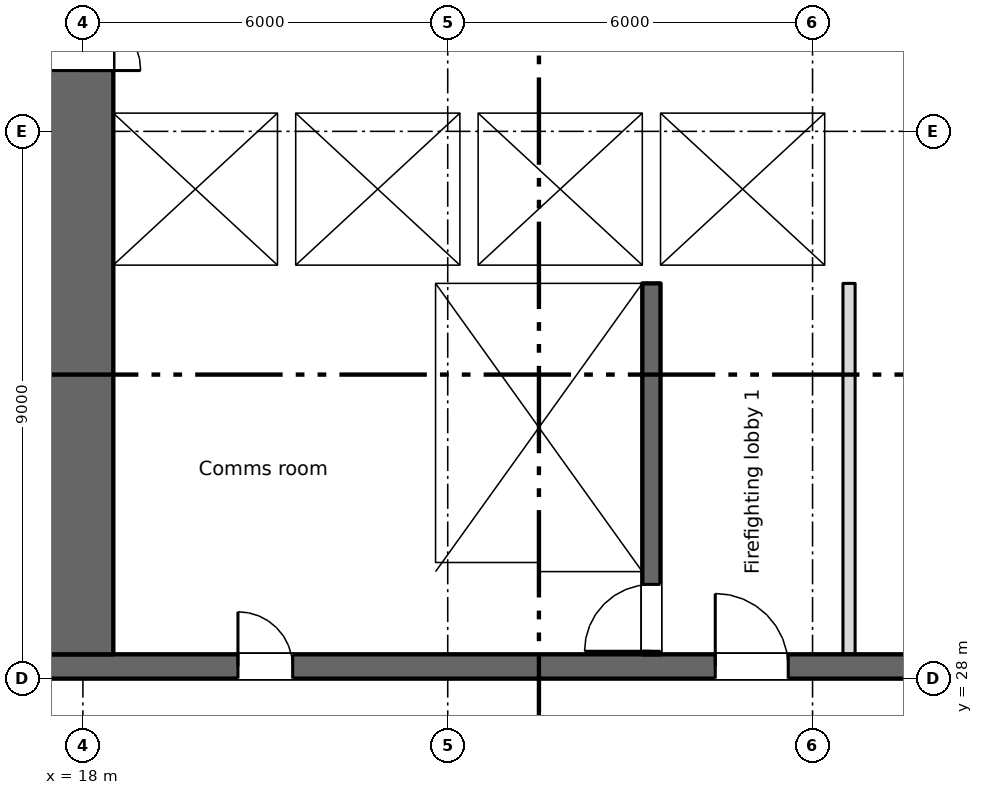
"""IFC4 building model, lengths in metres.
Left out: names, types, materials, properties, quantities, classifications, styles, units other than length and angle.
Written with IfcOpenShell. Run it as: python <this file> out.ifc"""

import sys

from ifc_helpers import new_model, si_unit, direction, frame, frame_2d, origin, place, context, subcontext, project, spatial, rectangle, extrude, element, fill, save


model = new_model("IFC4")
c1 = context("Model", 3, precision=1e-05, world=origin(), true_north=direction((0.0, 1.0)))
c2 = subcontext(c1, "Body", "Model", "MODEL_VIEW")
j1 = project(units=[si_unit("LENGTHUNIT", "METRE"), si_unit("PLANEANGLEUNIT", "RADIAN")], contexts=[c1])
p1 = place(None, origin())
s1 = spatial("IfcSite", under=j1, at=p1, CompositionType="ELEMENT")
p2 = place(p1, origin())
s2 = spatial("IfcBuilding", under=s1, at=p2, CompositionType="ELEMENT")
p3 = place(p2, frame((0.0, 0.0, 11.3)))
s3 = spatial("IfcBuildingStorey", under=s2, at=p3, CompositionType="ELEMENT", Elevation=11.3)
p4 = place(p3, frame((6.7, 28.2, 0.0), z_axis=(0.0, 0.0, 1.0), x_axis=(1.0, 0.0, 0.0)))
e1 = element("IfcWall", 1, at=p4, inside=s3, PredefinedType="SHEAR", context=c2, shape_type="SweptSolid", body=[
    extrude(rectangle(XDim=66.3, YDim=0.4, at=frame_2d((33.15, 0.0))), origin(), (0.0, 0.0, 1.0), 6.1),
])
p5 = place(p4, frame((13.85, 0.0, 0.0)))
e2 = element("IfcOpeningElement", 2, at=p5, cuts=e1, PredefinedType="OPENING", context=c2, shape_type="SweptSolid", body=[
    extrude(rectangle(XDim=0.9, YDim=2.1, at=frame_2d((0.45, 1.05))), frame((0.0, 0.21, 0.0), z_axis=(0.0, -1.0, 0.0), x_axis=(1.0, 0.0, 0.0)), (0.0, 0.0, 1.0), 0.42),
])
p6 = place(p4, frame((48.562, 0.0, 0.0)))
e3 = element("IfcOpeningElement", 3, at=p6, cuts=e1, PredefinedType="OPENING", context=c2, shape_type="SweptSolid", body=[
    extrude(rectangle(XDim=0.9, YDim=2.1, at=frame_2d((0.45, 1.05))), frame((0.0, 0.21, 0.0), z_axis=(0.0, -1.0, 0.0), x_axis=(1.0, 0.0, 0.0)), (0.0, 0.0, 1.0), 0.42),
])
p7 = place(p4, frame((51.137, 0.0, 0.0)))
e4 = element("IfcOpeningElement", 4, at=p7, cuts=e1, PredefinedType="OPENING", context=c2, shape_type="SweptSolid", body=[
    extrude(rectangle(XDim=0.9, YDim=2.1, at=frame_2d((0.45, 1.05))), frame((0.0, 0.21, 0.0), z_axis=(0.0, -1.0, 0.0), x_axis=(1.0, 0.0, 0.0)), (0.0, 0.0, 1.0), 0.42),
])
p8 = place(p4, frame((1.35, 0.0, 0.0)))
e5 = element("IfcOpeningElement", 5, at=p8, cuts=e1, PredefinedType="OPENING", context=c2, shape_type="SweptSolid", body=[
    extrude(rectangle(XDim=0.9, YDim=2.1, at=frame_2d((0.45, 1.05))), frame((0.0, 0.21, 0.0), z_axis=(0.0, -1.0, 0.0), x_axis=(1.0, 0.0, 0.0)), (0.0, 0.0, 1.0), 0.42),
])
p9 = place(p4, frame((59.363, 0.0, 0.0)))
e6 = element("IfcOpeningElement", 6, at=p9, cuts=e1, PredefinedType="OPENING", context=c2, shape_type="SweptSolid", body=[
    extrude(rectangle(XDim=0.9, YDim=2.1, at=frame_2d((0.45, 1.05))), frame((0.0, 0.21, 0.0), z_axis=(0.0, -1.0, 0.0), x_axis=(1.0, 0.0, 0.0)), (0.0, 0.0, 1.0), 0.42),
])
p10 = place(p4, frame((63.538, 0.0, 0.0)))
e7 = element("IfcOpeningElement", 7, at=p10, cuts=e1, PredefinedType="OPENING", context=c2, shape_type="SweptSolid", body=[
    extrude(rectangle(XDim=0.9, YDim=2.1, at=frame_2d((0.45, 1.05))), frame((0.0, 0.21, 0.0), z_axis=(0.0, -1.0, 0.0), x_axis=(1.0, 0.0, 0.0)), (0.0, 0.0, 1.0), 0.42),
])
p11 = place(p4, frame((4.7, 0.0, 0.0)))
e8 = element("IfcOpeningElement", 8, at=p11, cuts=e1, PredefinedType="OPENING", context=c2, shape_type="SweptSolid", body=[
    extrude(rectangle(XDim=1.2, YDim=2.1, at=frame_2d((0.6, 1.05))), frame((0.0, 0.21, 0.0), z_axis=(0.0, -1.0, 0.0), x_axis=(1.0, 0.0, 0.0)), (0.0, 0.0, 1.0), 0.42),
])
p12 = place(p4, frame((31.7, 0.0, 0.0)))
e9 = element("IfcOpeningElement", 9, at=p12, cuts=e1, PredefinedType="OPENING", context=c2, shape_type="SweptSolid", body=[
    extrude(rectangle(XDim=1.2, YDim=2.1, at=frame_2d((0.6, 1.05))), frame((0.0, 0.21, 0.0), z_axis=(0.0, -1.0, 0.0), x_axis=(1.0, 0.0, 0.0)), (0.0, 0.0, 1.0), 0.42),
])
p13 = place(p4, frame((55.2, 0.0, 0.0)))
e10 = element("IfcOpeningElement", 10, at=p13, cuts=e1, PredefinedType="OPENING", context=c2, shape_type="SweptSolid", body=[
    extrude(rectangle(XDim=1.2, YDim=2.1, at=frame_2d((0.6, 1.05))), frame((0.0, 0.21, 0.0), z_axis=(0.0, -1.0, 0.0), x_axis=(1.0, 0.0, 0.0)), (0.0, 0.0, 1.0), 0.42),
])
p14 = place(p4, frame((21.7, 0.0, 0.0)))
e11 = element("IfcOpeningElement", 11, at=p14, cuts=e1, PredefinedType="OPENING", context=c2, shape_type="SweptSolid", body=[
    extrude(rectangle(XDim=1.2, YDim=2.1, at=frame_2d((0.6, 1.05))), frame((0.0, 0.21, 0.0), z_axis=(0.0, -1.0, 0.0), x_axis=(1.0, 0.0, 0.0)), (0.0, 0.0, 1.0), 0.42),
])
p15 = place(p4, frame((41.7, 0.0, 0.0)))
e12 = element("IfcOpeningElement", 12, at=p15, cuts=e1, PredefinedType="OPENING", context=c2, shape_type="SweptSolid", body=[
    extrude(rectangle(XDim=1.2, YDim=2.1, at=frame_2d((0.6, 1.05))), frame((0.0, 0.21, 0.0), z_axis=(0.0, -1.0, 0.0), x_axis=(1.0, 0.0, 0.0)), (0.0, 0.0, 1.0), 0.42),
])
p16 = place(p4, frame((24.85, 0.0, 0.0)))
e13 = element("IfcOpeningElement", 13, at=p16, cuts=e1, PredefinedType="OPENING", context=c2, shape_type="SweptSolid", body=[
    extrude(rectangle(XDim=2.4, YDim=2.1, at=frame_2d((1.2, 1.05))), frame((0.0, 0.21, 0.0), z_axis=(0.0, -1.0, 0.0), x_axis=(1.0, 0.0, 0.0)), (0.0, 0.0, 1.0), 0.42),
])
p17 = place(p4, frame((37.35, 0.0, 0.0)))
e14 = element("IfcOpeningElement", 14, at=p17, cuts=e1, PredefinedType="OPENING", context=c2, shape_type="SweptSolid", body=[
    extrude(rectangle(XDim=2.4, YDim=2.1, at=frame_2d((1.2, 1.05))), frame((0.0, 0.21, 0.0), z_axis=(0.0, -1.0, 0.0), x_axis=(1.0, 0.0, 0.0)), (0.0, 0.0, 1.0), 0.42),
])
p18 = place(p4, frame((7.8, 0.0, 0.0)))
e15 = element("IfcOpeningElement", 15, at=p18, cuts=e1, PredefinedType="OPENING", context=c2, shape_type="SweptSolid", body=[
    extrude(rectangle(XDim=2.4, YDim=2.1, at=frame_2d((1.2, 1.05))), frame((0.0, 0.21, 0.0), z_axis=(0.0, -1.0, 0.0), x_axis=(1.0, 0.0, 0.0)), (0.0, 0.0, 1.0), 0.42),
])
p19 = place(p4, frame((28.85, 0.0, 0.0)))
e16 = element("IfcOpeningElement", 16, at=p19, cuts=e1, PredefinedType="OPENING", context=c2, shape_type="SweptSolid", body=[
    extrude(rectangle(XDim=0.9, YDim=2.1, at=frame_2d((0.45, 1.05))), frame((0.0, 0.21, 0.0), z_axis=(0.0, -1.0, 0.0), x_axis=(1.0, 0.0, 0.0)), (0.0, 0.0, 1.0), 0.42),
])
p20 = place(p4, frame((34.85, 0.0, 0.0)))
e17 = element("IfcOpeningElement", 17, at=p20, cuts=e1, PredefinedType="OPENING", context=c2, shape_type="SweptSolid", body=[
    extrude(rectangle(XDim=0.9, YDim=2.1, at=frame_2d((0.45, 1.05))), frame((0.0, 0.21, 0.0), z_axis=(0.0, -1.0, 0.0), x_axis=(1.0, 0.0, 0.0)), (0.0, 0.0, 1.0), 0.42),
])
p21 = place(p3, frame((17.95, 28.4, 0.0), z_axis=(0.0, 0.0, 1.0), x_axis=(0.0, 1.0, 0.0)))
e18 = element("IfcWall", 18, at=p21, inside=s3, PredefinedType="SHEAR", context=c2, shape_type="SweptSolid", body=[
    extrude(rectangle(XDim=16.5, YDim=1.1, at=frame_2d((8.25, 0.0))), origin(), (0.0, 0.0, 1.0), 6.1),
])
p22 = place(p21, frame((9.6, 0.0, 0.0)))
e19 = element("IfcOpeningElement", 19, at=p22, cuts=e18, PredefinedType="OPENING", context=c2, shape_type="SweptSolid", body=[
    extrude(rectangle(XDim=2.0, YDim=2.1, at=frame_2d((1.0, 1.05))), frame((0.0, 0.56, 0.0), z_axis=(0.0, -1.0, 0.0), x_axis=(1.0, 0.0, 0.0)), (0.0, 0.0, 1.0), 1.12),
])
p23 = place(p21, frame((15.2, 0.0, 0.0)))
e20 = element("IfcOpeningElement", 20, at=p23, cuts=e18, PredefinedType="OPENING", context=c2, shape_type="SweptSolid", body=[
    extrude(rectangle(XDim=1.2, YDim=2.1, at=frame_2d((0.6, 1.05))), frame((0.0, 0.56, 0.0), z_axis=(0.0, -1.0, 0.0), x_axis=(1.0, 0.0, 0.0)), (0.0, 0.0, 1.0), 1.12),
])
p24 = place(p3, frame((23.65, 28.4, 0.0), z_axis=(0.0, 0.0, 1.0), x_axis=(0.0, 1.0, 0.0)))
e21 = element("IfcWall", 21, at=p24, inside=s3, PredefinedType="SHEAR", context=c2, shape_type="SweptSolid", body=[
    extrude(rectangle(XDim=6.1, YDim=0.3, at=frame_2d((3.05, 0.0))), origin(), (0.0, 0.0, 1.0), 6.1),
])
p25 = place(p3, frame((27.35, 28.4, 0.0), z_axis=(0.0, 0.0, 1.0), x_axis=(0.0, 1.0, 0.0)))
e22 = element("IfcWall", 22, at=p25, inside=s3, PredefinedType="SHEAR", context=c2, shape_type="SweptSolid", body=[
    extrude(rectangle(XDim=6.1, YDim=0.3, at=frame_2d((3.05, 0.0))), origin(), (0.0, 0.0, 1.0), 6.1),
])
p26 = place(p25, frame((0.05, 0.0, 0.0)))
e23 = element("IfcOpeningElement", 23, at=p26, cuts=e22, PredefinedType="OPENING", context=c2, shape_type="SweptSolid", body=[
    extrude(rectangle(XDim=1.1, YDim=2.1, at=frame_2d((0.55, 1.05))), frame((0.0, 0.16, 0.0), z_axis=(0.0, -1.0, 0.0), x_axis=(1.0, 0.0, 0.0)), (0.0, 0.0, 1.0), 0.32),
])
p27 = place(p3, frame((18.5, 34.65, 0.0), z_axis=(0.0, 0.0, 1.0), x_axis=(1.0, 0.0, 0.0)))
e24 = element("IfcWall", 24, at=p27, inside=s3, PredefinedType="SHEAR", context=c2, shape_type="SweptSolid", body=[
    extrude(rectangle(XDim=12.2, YDim=0.3, at=frame_2d((6.1, 0.0))), origin(), (0.0, 0.0, 1.0), 6.1),
])
p28 = place(p27, frame((9.8, 0.0, 0.0)))
e25 = element("IfcOpeningElement", 25, at=p28, cuts=e24, PredefinedType="OPENING", context=c2, shape_type="SweptSolid", body=[
    extrude(rectangle(XDim=1.1, YDim=2.1, at=frame_2d((0.55, 1.05))), frame((0.0, 0.16, 0.0), z_axis=(0.0, -1.0, 0.0), x_axis=(1.0, 0.0, 0.0)), (0.0, 0.0, 1.0), 0.32),
])
p29 = place(p3, frame((18.5, 37.45, 0.0), z_axis=(0.0, 0.0, 1.0), x_axis=(1.0, 0.0, 0.0)))
e26 = element("IfcWall", 26, at=p29, inside=s3, PredefinedType="SHEAR", context=c2, shape_type="SweptSolid", body=[
    extrude(rectangle(XDim=12.2, YDim=0.3, at=frame_2d((6.1, 0.0))), origin(), (0.0, 0.0, 1.0), 6.1),
])
p30 = place(p29, frame((0.8, 0.0, 0.0)))
e27 = element("IfcOpeningElement", 27, at=p30, cuts=e26, PredefinedType="OPENING", context=c2, shape_type="SweptSolid", body=[
    extrude(rectangle(XDim=1.1, YDim=2.1, at=frame_2d((0.55, 1.05))), frame((0.0, 0.16, 0.0), z_axis=(0.0, -1.0, 0.0), x_axis=(1.0, 0.0, 0.0)), (0.0, 0.0, 1.0), 0.32),
])
p31 = place(p29, frame((3.8, 0.0, 0.0)))
e28 = element("IfcOpeningElement", 28, at=p31, cuts=e26, PredefinedType="OPENING", context=c2, shape_type="SweptSolid", body=[
    extrude(rectangle(XDim=1.1, YDim=2.1, at=frame_2d((0.55, 1.05))), frame((0.0, 0.16, 0.0), z_axis=(0.0, -1.0, 0.0), x_axis=(1.0, 0.0, 0.0)), (0.0, 0.0, 1.0), 0.32),
])
p32 = place(p29, frame((6.8, 0.0, 0.0)))
e29 = element("IfcOpeningElement", 29, at=p32, cuts=e26, PredefinedType="OPENING", context=c2, shape_type="SweptSolid", body=[
    extrude(rectangle(XDim=1.1, YDim=2.1, at=frame_2d((0.55, 1.05))), frame((0.0, 0.16, 0.0), z_axis=(0.0, -1.0, 0.0), x_axis=(1.0, 0.0, 0.0)), (0.0, 0.0, 1.0), 0.32),
])
p33 = place(p3, frame((27.35, 34.8, 0.0), z_axis=(0.0, 0.0, 1.0), x_axis=(0.0, 1.0, 0.0)))
e30 = element("IfcWall", 30, at=p33, inside=s3, PredefinedType="SHEAR", context=c2, shape_type="SweptSolid", body=[
    extrude(rectangle(XDim=2.5, YDim=0.3, at=frame_2d((1.25, 0.0))), origin(), (0.0, 0.0, 1.0), 6.1),
])
p34 = place(p3, frame((30.45, 34.8, 0.0), z_axis=(0.0, 0.0, 1.0), x_axis=(0.0, 1.0, 0.0)))
e31 = element("IfcWall", 31, at=p34, inside=s3, PredefinedType="SHEAR", context=c2, shape_type="SweptSolid", body=[
    extrude(rectangle(XDim=2.5, YDim=0.5, at=frame_2d((1.25, 0.0))), origin(), (0.0, 0.0, 1.0), 6.1),
])
for number, where, z_axis, x_axis in (
    (32, (21.35, 34.8, 0.0), (0.0, 0.0, 1.0), (0.0, 1.0, 0.0)),
    (33, (24.35, 34.8, 0.0), (0.0, 0.0, 1.0), (0.0, 1.0, 0.0)),
):
    element("IfcWall", number, at=place(p3, frame(where, z_axis=z_axis, x_axis=x_axis)), inside=s3, PredefinedType="SHEAR", context=c2, shape_type="SweptSolid", body=[
        extrude(rectangle(XDim=2.5, YDim=0.3, at=frame_2d((1.25, 0.0))), origin(), (0.0, 0.0, 1.0), 6.1),
    ])
p35 = place(p3, frame((30.6, 28.4, 0.0), z_axis=(0.0, 0.0, 1.0), x_axis=(0.0, 1.0, 0.0)))
e34 = element("IfcWall", 34, at=p35, inside=s3, PredefinedType="PARTITIONING", context=c2, shape_type="SweptSolid", body=[
    extrude(rectangle(XDim=6.1, YDim=0.2, at=frame_2d((3.05, 0.0))), origin(), (0.0, 0.0, 1.0), 6.1),
])
p36 = place(p5, origin())
e35 = element("IfcDoor", 35, at=p36, inside=s3, OperationType="SINGLE_SWING_LEFT", PredefinedType="DOOR", context=c2, shape_type="SweptSolid", body=[
    extrude(rectangle(XDim=0.9, YDim=2.1, at=frame_2d((0.45, 1.05))), frame((0.0, 0.025, 0.0), z_axis=(0.0, -1.0, 0.0), x_axis=(1.0, 0.0, 0.0)), (0.0, 0.0, 1.0), 0.05),
])
fill(e2, e35)
p37 = place(p30, origin())
e36 = element("IfcDoor", 36, at=p37, inside=s3, OperationType="SLIDING_TO_LEFT", PredefinedType="DOOR", context=c2, shape_type="SweptSolid", body=[
    extrude(rectangle(XDim=1.1, YDim=2.1, at=frame_2d((0.55, 1.05))), frame((0.0, 0.025, 0.0), z_axis=(0.0, -1.0, 0.0), x_axis=(1.0, 0.0, 0.0)), (0.0, 0.0, 1.0), 0.05),
])
fill(e27, e36)
p38 = place(p31, origin())
e37 = element("IfcDoor", 37, at=p38, inside=s3, OperationType="SLIDING_TO_LEFT", PredefinedType="DOOR", context=c2, shape_type="SweptSolid", body=[
    extrude(rectangle(XDim=1.1, YDim=2.1, at=frame_2d((0.55, 1.05))), frame((0.0, 0.025, 0.0), z_axis=(0.0, -1.0, 0.0), x_axis=(1.0, 0.0, 0.0)), (0.0, 0.0, 1.0), 0.05),
])
fill(e28, e37)
p39 = place(p32, origin())
e38 = element("IfcDoor", 38, at=p39, inside=s3, OperationType="SLIDING_TO_LEFT", PredefinedType="DOOR", context=c2, shape_type="SweptSolid", body=[
    extrude(rectangle(XDim=1.1, YDim=2.1, at=frame_2d((0.55, 1.05))), frame((0.0, 0.025, 0.0), z_axis=(0.0, -1.0, 0.0), x_axis=(1.0, 0.0, 0.0)), (0.0, 0.0, 1.0), 0.05),
])
fill(e29, e38)
p40 = place(p28, origin())
e39 = element("IfcDoor", 39, at=p40, inside=s3, OperationType="SLIDING_TO_LEFT", PredefinedType="DOOR", context=c2, shape_type="SweptSolid", body=[
    extrude(rectangle(XDim=1.1, YDim=2.1, at=frame_2d((0.55, 1.05))), frame((0.0, 0.025, 0.0), z_axis=(0.0, -1.0, 0.0), x_axis=(1.0, 0.0, 0.0)), (0.0, 0.0, 1.0), 0.05),
])
fill(e25, e39)
p41 = place(p26, origin())
e40 = element("IfcDoor", 40, at=p41, inside=s3, OperationType="SINGLE_SWING_LEFT", PredefinedType="DOOR", context=c2, shape_type="SweptSolid", body=[
    extrude(rectangle(XDim=1.1, YDim=2.1, at=frame_2d((0.55, 1.05))), frame((0.0, 0.025, 0.0), z_axis=(0.0, -1.0, 0.0), x_axis=(1.0, 0.0, 0.0)), (0.0, 0.0, 1.0), 0.05),
])
fill(e23, e40)
p42 = place(p14, origin())
e41 = element("IfcDoor", 41, at=p42, inside=s3, OperationType="SINGLE_SWING_LEFT", PredefinedType="DOOR", context=c2, shape_type="SweptSolid", body=[
    extrude(rectangle(XDim=1.2, YDim=2.1, at=frame_2d((0.6, 1.05))), frame((0.0, 0.025, 0.0), z_axis=(0.0, -1.0, 0.0), x_axis=(1.0, 0.0, 0.0)), (0.0, 0.0, 1.0), 0.05),
])
fill(e11, e41)
p43 = place(p22, origin())
e42 = element("IfcDoor", 42, at=p43, inside=s3, OperationType="DOUBLE_DOOR_SINGLE_SWING", PredefinedType="DOOR", context=c2, shape_type="SweptSolid", body=[
    extrude(rectangle(XDim=2.0, YDim=2.1, at=frame_2d((1.0, 1.05))), frame((0.0, 0.025, 0.0), z_axis=(0.0, -1.0, 0.0), x_axis=(1.0, 0.0, 0.0)), (0.0, 0.0, 1.0), 0.05),
])
fill(e19, e42)
save(model, sys.argv[1])
